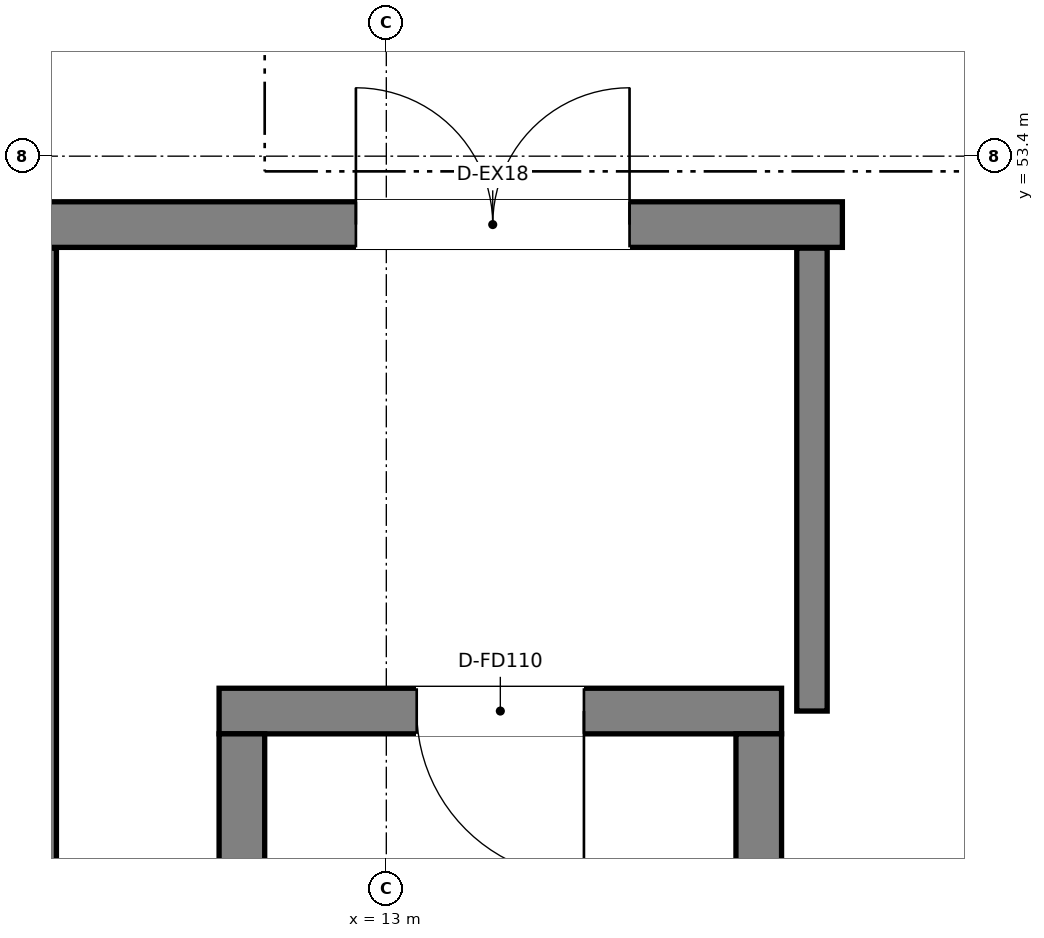
"""IFC4 building model, lengths in metres.
Left out: names, types, materials, properties, quantities, classifications, styles, units other than length and angle.
Written with IfcOpenShell. Run it as: python <this file> out.ifc"""

import sys

from ifc_helpers import new_model, si_unit, direction, frame, frame_2d, origin, origin_2d, place, context, subcontext, project, spatial, rectangle, hollow_rectangle, extrude, source, transform, mapped, element, fill, save


model = new_model("IFC4")
c1 = context("Model", 3, precision=1e-05, world=origin(), true_north=direction((0.0, 1.0)))
c2 = subcontext(c1, "Body", "Model", "MODEL_VIEW")
j1 = project(units=[si_unit("LENGTHUNIT", "METRE"), si_unit("PLANEANGLEUNIT", "RADIAN")], contexts=[c1])
p1 = place(None, origin())
s1 = spatial("IfcSite", under=j1, at=p1, CompositionType="ELEMENT")
p2 = place(p1, origin())
s2 = spatial("IfcBuilding", under=s1, at=p2, CompositionType="ELEMENT")
p3 = place(p2, origin())
s3 = spatial("IfcBuildingStorey", under=s2, at=p3, CompositionType="ELEMENT", Elevation=0.0)
p4 = place(p3, frame((15.6, 49.75, 0.0), z_axis=(0.0, 0.0, 1.0), x_axis=(-1.0, 0.0, 0.0)))
e1 = element("IfcWall", 1, at=p4, inside=s3, PredefinedType="SHEAR", context=c2, shape_type="SweptSolid", body=[
    extrude(rectangle(XDim=3.7, YDim=0.3, at=frame_2d((1.85, 0.0))), origin(), (0.0, 0.0, 1.0), 5.4),
])
p5 = place(p4, frame((1.3, 0.0, 0.0)))
e2 = element("IfcOpeningElement", 2, at=p5, cuts=e1, PredefinedType="OPENING", context=c2, shape_type="SweptSolid", body=[
    extrude(rectangle(XDim=1.1, YDim=2.15, at=frame_2d((0.55, 1.075))), frame((0.0, 0.16, 0.0), z_axis=(0.0, -1.0, 0.0), x_axis=(1.0, 0.0, 0.0)), (0.0, 0.0, 1.0), 0.32),
])
for number, where, z_axis, x_axis in (
    (3, (12.05, 42.12, 0.0), (0.0, 0.0, 1.0), (0.0, 1.0, 0.0)),
    (4, (15.45, 42.12, 0.0), (0.0, 0.0, 1.0), (0.0, 1.0, 0.0)),
):
    element("IfcWall", number, at=place(p3, frame(where, z_axis=z_axis, x_axis=x_axis)), inside=s3, PredefinedType="SHEAR", context=c2, shape_type="SweptSolid", body=[
        extrude(rectangle(XDim=7.48, YDim=0.3, at=frame_2d((3.74, 0.0))), origin(), (0.0, 0.0, 1.0), 5.4),
    ])
m1 = source(origin(), c2, "Body", "SweptSolid", [
    extrude(hollow_rectangle(XDim=0.3, YDim=0.3, WallThickness=0.02, at=origin_2d()), origin(), (0.0, 0.0, 1.0), 4.8),
])
p6 = place(p3, frame((12.6, 53.6, 0.0), z_axis=(0.0, 0.0, 1.0), x_axis=(1.0, 0.0, 0.0)))
e5 = element("IfcColumn", 5, at=p6, inside=s3, PredefinedType="COLUMN", context=c2, shape_type="MappedRepresentation", body=[
    mapped(m1, transform((0.0, 0.0, 0.0), x_axis=(1.0, 0.0, 0.0), y_axis=(0.0, 1.0, 0.0), z_axis=(0.0, 0.0, 1.0), scale=1.0)),
])
m2 = source(origin(), c2, "Body", "SweptSolid", [
    extrude(rectangle(XDim=0.6, YDim=0.6, at=origin_2d()), origin(), (0.0, 0.0, 1.0), 5.4),
])
p7 = place(p3, frame((11.5, 50.1, 0.0), z_axis=(0.0, 0.0, 1.0), x_axis=(1.0, 0.0, 0.0)))
e6 = element("IfcColumn", 6, at=p7, inside=s3, PredefinedType="COLUMN", context=c2, shape_type="MappedRepresentation", body=[
    mapped(m2, transform((0.0, 0.0, 0.0), x_axis=(1.0, 0.0, 0.0), y_axis=(0.0, 1.0, 0.0), z_axis=(0.0, 0.0, 1.0), scale=1.0)),
])
p8 = place(p3, frame((0.0, 52.95, 0.0), z_axis=(0.0, 0.0, 1.0), x_axis=(1.0, 0.0, 0.0)))
e7 = element("IfcWall", 7, at=p8, inside=s3, PredefinedType="SOLIDWALL", context=c2, shape_type="SweptSolid", body=[
    extrude(rectangle(XDim=16.0, YDim=0.3, at=frame_2d((8.0, 0.0))), origin(), (0.0, 0.0, 1.0), 5.1),
])
p9 = place(p8, frame((12.8, 0.0, 0.0)))
e8 = element("IfcOpeningElement", 8, at=p9, cuts=e7, PredefinedType="OPENING", context=c2, shape_type="SweptSolid", body=[
    extrude(rectangle(XDim=1.8, YDim=2.25, at=frame_2d((0.9, 1.125))), frame((0.0, 0.16, 0.0), z_axis=(0.0, -1.0, 0.0), x_axis=(1.0, 0.0, 0.0)), (0.0, 0.0, 1.0), 0.32),
])
p10 = place(p8, frame((5.5, 0.0, 0.0)))
e9 = element("IfcOpeningElement", 9, at=p10, cuts=e7, PredefinedType="OPENING", context=c2, shape_type="SweptSolid", body=[
    extrude(rectangle(XDim=2.0, YDim=2.4, at=frame_2d((1.0, 1.2))), frame((0.0, 0.16, 0.0), z_axis=(0.0, -1.0, 0.0), x_axis=(1.0, 0.0, 0.0)), (0.0, 0.0, 1.0), 0.32),
])
p11 = place(p3, frame((10.75, 0.605, 0.0), z_axis=(0.0, 0.0, 1.0), x_axis=(0.0, 1.0, 0.0)))
e10 = element("IfcWall", 10, at=p11, inside=s3, PredefinedType="PARTITIONING", context=c2, shape_type="SweptSolid", body=[
    extrude(rectangle(XDim=52.19, YDim=0.16, at=frame_2d((26.095, 0.0))), origin(), (0.0, 0.0, 1.0), 4.1),
])
p12 = place(p11, frame((19.795, 0.0, 0.0)))
e11 = element("IfcOpeningElement", 11, at=p12, cuts=e10, PredefinedType="OPENING", context=c2, shape_type="SweptSolid", body=[
    extrude(rectangle(XDim=1.2, YDim=2.15, at=frame_2d((0.6, 1.075))), frame((0.0, 0.09, 0.0), z_axis=(0.0, -1.0, 0.0), x_axis=(1.0, 0.0, 0.0)), (0.0, 0.0, 1.0), 0.18),
])
p13 = place(p11, frame((29.795, 0.0, 0.0)))
e12 = element("IfcOpeningElement", 12, at=p13, cuts=e10, PredefinedType="OPENING", context=c2, shape_type="SweptSolid", body=[
    extrude(rectangle(XDim=1.2, YDim=2.15, at=frame_2d((0.6, 1.075))), frame((0.0, 0.09, 0.0), z_axis=(0.0, -1.0, 0.0), x_axis=(1.0, 0.0, 0.0)), (0.0, 0.0, 1.0), 0.18),
])
p14 = place(p3, frame((15.8, 49.75, 0.0), z_axis=(0.0, 0.0, 1.0), x_axis=(0.0, 1.0, 0.0)))
e13 = element("IfcWall", 13, at=p14, inside=s3, PredefinedType="PARTITIONING", context=c2, shape_type="SweptSolid", body=[
    extrude(rectangle(XDim=3.045, YDim=0.2, at=frame_2d((1.522, 0.0))), origin(), (0.0, 0.0, 1.0), 4.46),
])
p15 = place(p9, origin())
e14 = element("IfcDoor", 14, at=p15, inside=s3, OperationType="DOUBLE_DOOR_SINGLE_SWING", PredefinedType="DOOR", context=c2, shape_type="SweptSolid", body=[
    extrude(rectangle(XDim=1.8, YDim=2.25, at=frame_2d((0.9, 1.125))), frame((0.0, 0.025, 0.0), z_axis=(0.0, -1.0, 0.0), x_axis=(1.0, 0.0, 0.0)), (0.0, 0.0, 1.0), 0.05),
])
fill(e8, e14)
p16 = place(p5, origin())
e15 = element("IfcDoor", 15, at=p16, inside=s3, OperationType="SINGLE_SWING_LEFT", PredefinedType="DOOR", context=c2, shape_type="SweptSolid", body=[
    extrude(rectangle(XDim=1.1, YDim=2.15, at=frame_2d((0.55, 1.075))), frame((0.0, 0.025, 0.0), z_axis=(0.0, -1.0, 0.0), x_axis=(1.0, 0.0, 0.0)), (0.0, 0.0, 1.0), 0.05),
])
fill(e2, e15)
save(model, sys.argv[1])
